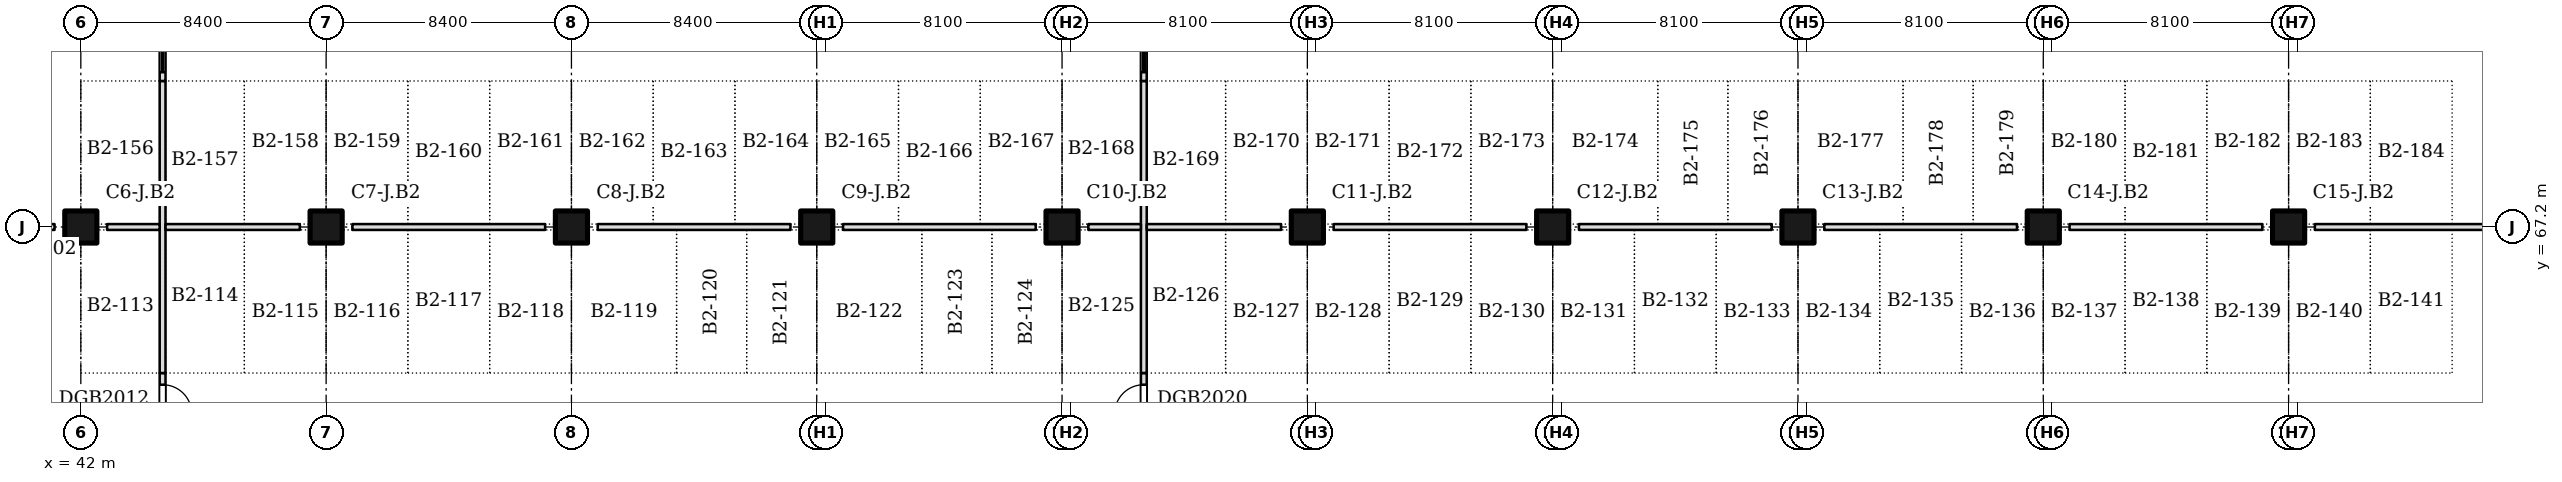
"""IFC4 building model, lengths in metres.
Left out: names, types, materials, properties, quantities, classifications, styles, units other than length and angle.
Written with IfcOpenShell. Run it as: python <this file> out.ifc"""

import sys

from ifc_helpers import new_model, si_unit, direction, frame, frame_2d, origin, origin_2d, place, context, subcontext, project, spatial, rectangle, extrude, element, fill, save


model = new_model("IFC4")
c1 = context("Model", 3, precision=1e-05, world=origin(), true_north=direction((0.0, 1.0)))
c2 = subcontext(c1, "Body", "Model", "MODEL_VIEW")
j1 = project(units=[si_unit("LENGTHUNIT", "METRE"), si_unit("PLANEANGLEUNIT", "RADIAN")], contexts=[c1])
p1 = place(None, origin())
s1 = spatial("IfcSite", under=j1, at=p1, CompositionType="ELEMENT")
p2 = place(p1, origin())
s2 = spatial("IfcBuilding", under=s1, at=p2, CompositionType="ELEMENT")
p3 = place(p2, frame((0.0, 0.0, -8.0)))
s3 = spatial("IfcBuildingStorey", under=s2, at=p3, CompositionType="ELEMENT", Elevation=-8.0)
for number, where, z_axis, x_axis in (
    (1, (42.0, 67.2, 0.0), (0.0, 0.0, 1.0), (1.0, 0.0, 0.0)),
    (2, (50.4, 67.2, 0.0), (0.0, 0.0, 1.0), (1.0, 0.0, 0.0)),
    (3, (58.8, 67.2, 0.0), (0.0, 0.0, 1.0), (1.0, 0.0, 0.0)),
    (4, (67.2, 67.2, 0.0), (0.0, 0.0, 1.0), (1.0, 0.0, 0.0)),
    (5, (75.6, 67.2, 0.0), (0.0, 0.0, 1.0), (1.0, 0.0, 0.0)),
    (6, (84.0, 67.2, 0.0), (0.0, 0.0, 1.0), (1.0, 0.0, 0.0)),
    (7, (92.4, 67.2, 0.0), (0.0, 0.0, 1.0), (1.0, 0.0, 0.0)),
    (8, (100.8, 67.2, 0.0), (0.0, 0.0, 1.0), (1.0, 0.0, 0.0)),
    (9, (109.2, 67.2, 0.0), (0.0, 0.0, 1.0), (1.0, 0.0, 0.0)),
    (10, (117.6, 67.2, 0.0), (0.0, 0.0, 1.0), (1.0, 0.0, 0.0)),
):
    element("IfcColumn", number, at=place(p3, frame(where, z_axis=z_axis, x_axis=x_axis)), inside=s3, PredefinedType="COLUMN", context=c2, shape_type="SweptSolid", body=[
        extrude(rectangle(XDim=1.1, YDim=1.1, at=origin_2d()), origin(), (0.0, 0.0, 1.0), 3.7),
    ])
p4 = place(p3, frame((44.8, 55.4, 0.0), z_axis=(0.0, 0.0, 1.0), x_axis=(0.0, 1.0, 0.0)))
e11 = element("IfcWall", 11, at=p4, inside=s3, PredefinedType="PARTITIONING", context=c2, shape_type="SweptSolid", body=[
    extrude(rectangle(XDim=6.8, YDim=0.2, at=frame_2d((3.4, 0.0))), origin(), (0.0, 0.0, 1.0), 3.7),
])
p5 = place(p4, frame((0.3, 0.0, 0.0)))
e12 = element("IfcOpeningElement", 12, at=p5, cuts=e11, PredefinedType="OPENING", context=c2, shape_type="SweptSolid", body=[
    extrude(rectangle(XDim=4.8, YDim=2.4, at=frame_2d((2.4, 1.2))), frame((0.0, 0.11, 0.0), z_axis=(0.0, -1.0, 0.0), x_axis=(1.0, 0.0, 0.0)), (0.0, 0.0, 1.0), 0.22),
])
p6 = place(p4, frame((5.4, 0.0, 0.0)))
e13 = element("IfcOpeningElement", 13, at=p6, cuts=e11, PredefinedType="OPENING", context=c2, shape_type="SweptSolid", body=[
    extrude(rectangle(XDim=1.0, YDim=2.1, at=frame_2d((0.5, 1.05))), frame((0.0, 0.11, 0.0), z_axis=(0.0, -1.0, 0.0), x_axis=(1.0, 0.0, 0.0)), (0.0, 0.0, 1.0), 0.22),
])
p7 = place(p3, frame((44.8, 62.2, 0.0), z_axis=(0.0, 0.0, 1.0), x_axis=(0.0, 1.0, 0.0)))
e14 = element("IfcWall", 14, at=p7, inside=s3, PredefinedType="PARTITIONING", context=c2, shape_type="SweptSolid", body=[
    extrude(rectangle(XDim=10.0, YDim=0.2, at=frame_2d((5.0, 0.0))), origin(), (0.0, 0.0, 1.0), 3.7),
])
p8 = place(p3, frame((44.8, 72.2, 0.0), z_axis=(0.0, 0.0, 1.0), x_axis=(0.0, 1.0, 0.0)))
e15 = element("IfcWall", 15, at=p8, inside=s3, PredefinedType="PARTITIONING", context=c2, shape_type="SweptSolid", body=[
    extrude(rectangle(XDim=6.8, YDim=0.2, at=frame_2d((3.4, 0.0))), origin(), (0.0, 0.0, 1.0), 3.7),
])
p9 = place(p8, frame((0.3, 0.0, 0.0)))
e16 = element("IfcOpeningElement", 16, at=p9, cuts=e15, PredefinedType="OPENING", context=c2, shape_type="SweptSolid", body=[
    extrude(rectangle(XDim=4.8, YDim=2.4, at=frame_2d((2.4, 1.2))), frame((0.0, 0.11, 0.0), z_axis=(0.0, -1.0, 0.0), x_axis=(1.0, 0.0, 0.0)), (0.0, 0.0, 1.0), 0.22),
])
p10 = place(p8, frame((5.4, 0.0, 0.0)))
e17 = element("IfcOpeningElement", 17, at=p10, cuts=e15, PredefinedType="OPENING", context=c2, shape_type="SweptSolid", body=[
    extrude(rectangle(XDim=1.0, YDim=2.1, at=frame_2d((0.5, 1.05))), frame((0.0, 0.11, 0.0), z_axis=(0.0, -1.0, 0.0), x_axis=(1.0, 0.0, 0.0)), (0.0, 0.0, 1.0), 0.22),
])
p11 = place(p3, frame((78.4, 55.4, 0.0), z_axis=(0.0, 0.0, 1.0), x_axis=(0.0, 1.0, 0.0)))
e18 = element("IfcWall", 18, at=p11, inside=s3, PredefinedType="PARTITIONING", context=c2, shape_type="SweptSolid", body=[
    extrude(rectangle(XDim=6.8, YDim=0.2, at=frame_2d((3.4, 0.0))), origin(), (0.0, 0.0, 1.0), 3.7),
])
p12 = place(p11, frame((0.3, 0.0, 0.0)))
e19 = element("IfcOpeningElement", 19, at=p12, cuts=e18, PredefinedType="OPENING", context=c2, shape_type="SweptSolid", body=[
    extrude(rectangle(XDim=4.8, YDim=2.4, at=frame_2d((2.4, 1.2))), frame((0.0, 0.11, 0.0), z_axis=(0.0, -1.0, 0.0), x_axis=(1.0, 0.0, 0.0)), (0.0, 0.0, 1.0), 0.22),
])
p13 = place(p11, frame((5.4, 0.0, 0.0)))
e20 = element("IfcOpeningElement", 20, at=p13, cuts=e18, PredefinedType="OPENING", context=c2, shape_type="SweptSolid", body=[
    extrude(rectangle(XDim=1.0, YDim=2.1, at=frame_2d((0.5, 1.05))), frame((0.0, 0.11, 0.0), z_axis=(0.0, -1.0, 0.0), x_axis=(1.0, 0.0, 0.0)), (0.0, 0.0, 1.0), 0.22),
])
p14 = place(p3, frame((78.4, 62.2, 0.0), z_axis=(0.0, 0.0, 1.0), x_axis=(0.0, 1.0, 0.0)))
e21 = element("IfcWall", 21, at=p14, inside=s3, PredefinedType="PARTITIONING", context=c2, shape_type="SweptSolid", body=[
    extrude(rectangle(XDim=10.0, YDim=0.2, at=frame_2d((5.0, 0.0))), origin(), (0.0, 0.0, 1.0), 3.7),
])
p15 = place(p3, frame((78.4, 72.2, 0.0), z_axis=(0.0, 0.0, 1.0), x_axis=(0.0, 1.0, 0.0)))
e22 = element("IfcWall", 22, at=p15, inside=s3, PredefinedType="PARTITIONING", context=c2, shape_type="SweptSolid", body=[
    extrude(rectangle(XDim=6.8, YDim=0.2, at=frame_2d((3.4, 0.0))), origin(), (0.0, 0.0, 1.0), 3.7),
])
p16 = place(p15, frame((0.3, 0.0, 0.0)))
e23 = element("IfcOpeningElement", 23, at=p16, cuts=e22, PredefinedType="OPENING", context=c2, shape_type="SweptSolid", body=[
    extrude(rectangle(XDim=4.8, YDim=2.4, at=frame_2d((2.4, 1.2))), frame((0.0, 0.11, 0.0), z_axis=(0.0, -1.0, 0.0), x_axis=(1.0, 0.0, 0.0)), (0.0, 0.0, 1.0), 0.22),
])
p17 = place(p15, frame((5.4, 0.0, 0.0)))
e24 = element("IfcOpeningElement", 24, at=p17, cuts=e22, PredefinedType="OPENING", context=c2, shape_type="SweptSolid", body=[
    extrude(rectangle(XDim=1.0, YDim=2.1, at=frame_2d((0.5, 1.05))), frame((0.0, 0.11, 0.0), z_axis=(0.0, -1.0, 0.0), x_axis=(1.0, 0.0, 0.0)), (0.0, 0.0, 1.0), 0.22),
])
p18 = place(p3, frame((34.5, 67.2, 0.0), z_axis=(0.0, 0.0, 1.0), x_axis=(1.0, 0.0, 0.0)))
e25 = element("IfcWall", 25, at=p18, inside=s3, PredefinedType="PARTITIONING", context=c2, shape_type="SweptSolid", body=[
    extrude(rectangle(XDim=6.6, YDim=0.2, at=frame_2d((3.3, 0.0))), origin(), (0.0, 0.0, 1.0), 3.7),
])
p19 = place(p18, frame((0.3, 0.0, 0.0)))
e26 = element("IfcOpeningElement", 26, at=p19, cuts=e25, PredefinedType="OPENING", context=c2, shape_type="SweptSolid", body=[
    extrude(rectangle(XDim=4.8, YDim=2.4, at=frame_2d((2.4, 1.2))), frame((0.0, 0.11, 0.0), z_axis=(0.0, -1.0, 0.0), x_axis=(1.0, 0.0, 0.0)), (0.0, 0.0, 1.0), 0.22),
])
p20 = place(p18, frame((5.3, 0.0, 0.0)))
e27 = element("IfcOpeningElement", 27, at=p20, cuts=e25, PredefinedType="OPENING", context=c2, shape_type="SweptSolid", body=[
    extrude(rectangle(XDim=1.0, YDim=2.1, at=frame_2d((0.5, 1.05))), frame((0.0, 0.11, 0.0), z_axis=(0.0, -1.0, 0.0), x_axis=(1.0, 0.0, 0.0)), (0.0, 0.0, 1.0), 0.22),
])
p21 = place(p3, frame((42.9, 67.2, 0.0), z_axis=(0.0, 0.0, 1.0), x_axis=(1.0, 0.0, 0.0)))
e28 = element("IfcWall", 28, at=p21, inside=s3, PredefinedType="PARTITIONING", context=c2, shape_type="SweptSolid", body=[
    extrude(rectangle(XDim=1.8, YDim=0.2, at=frame_2d((0.9, 0.0))), origin(), (0.0, 0.0, 1.0), 3.7),
])
p22 = place(p3, frame((44.9, 67.2, 0.0), z_axis=(0.0, 0.0, 1.0), x_axis=(1.0, 0.0, 0.0)))
e29 = element("IfcWall", 29, at=p22, inside=s3, PredefinedType="PARTITIONING", context=c2, shape_type="SweptSolid", body=[
    extrude(rectangle(XDim=4.6, YDim=0.2, at=frame_2d((2.3, 0.0))), origin(), (0.0, 0.0, 1.0), 3.7),
])
p23 = place(p3, frame((51.3, 67.2, 0.0), z_axis=(0.0, 0.0, 1.0), x_axis=(1.0, 0.0, 0.0)))
e30 = element("IfcWall", 30, at=p23, inside=s3, PredefinedType="PARTITIONING", context=c2, shape_type="SweptSolid", body=[
    extrude(rectangle(XDim=6.6, YDim=0.2, at=frame_2d((3.3, 0.0))), origin(), (0.0, 0.0, 1.0), 3.7),
])
p24 = place(p3, frame((59.7, 67.2, 0.0), z_axis=(0.0, 0.0, 1.0), x_axis=(1.0, 0.0, 0.0)))
e31 = element("IfcWall", 31, at=p24, inside=s3, PredefinedType="PARTITIONING", context=c2, shape_type="SweptSolid", body=[
    extrude(rectangle(XDim=6.6, YDim=0.2, at=frame_2d((3.3, 0.0))), origin(), (0.0, 0.0, 1.0), 3.7),
])
p25 = place(p3, frame((68.1, 67.2, 0.0), z_axis=(0.0, 0.0, 1.0), x_axis=(1.0, 0.0, 0.0)))
e32 = element("IfcWall", 32, at=p25, inside=s3, PredefinedType="PARTITIONING", context=c2, shape_type="SweptSolid", body=[
    extrude(rectangle(XDim=6.6, YDim=0.2, at=frame_2d((3.3, 0.0))), origin(), (0.0, 0.0, 1.0), 3.7),
])
p26 = place(p3, frame((76.5, 67.2, 0.0), z_axis=(0.0, 0.0, 1.0), x_axis=(1.0, 0.0, 0.0)))
e33 = element("IfcWall", 33, at=p26, inside=s3, PredefinedType="PARTITIONING", context=c2, shape_type="SweptSolid", body=[
    extrude(rectangle(XDim=1.8, YDim=0.2, at=frame_2d((0.9, 0.0))), origin(), (0.0, 0.0, 1.0), 3.7),
])
p27 = place(p3, frame((78.5, 67.2, 0.0), z_axis=(0.0, 0.0, 1.0), x_axis=(1.0, 0.0, 0.0)))
e34 = element("IfcWall", 34, at=p27, inside=s3, PredefinedType="PARTITIONING", context=c2, shape_type="SweptSolid", body=[
    extrude(rectangle(XDim=4.6, YDim=0.2, at=frame_2d((2.3, 0.0))), origin(), (0.0, 0.0, 1.0), 3.7),
])
p28 = place(p3, frame((84.9, 67.2, 0.0), z_axis=(0.0, 0.0, 1.0), x_axis=(1.0, 0.0, 0.0)))
e35 = element("IfcWall", 35, at=p28, inside=s3, PredefinedType="PARTITIONING", context=c2, shape_type="SweptSolid", body=[
    extrude(rectangle(XDim=6.6, YDim=0.2, at=frame_2d((3.3, 0.0))), origin(), (0.0, 0.0, 1.0), 3.7),
])
p29 = place(p3, frame((93.3, 67.2, 0.0), z_axis=(0.0, 0.0, 1.0), x_axis=(1.0, 0.0, 0.0)))
e36 = element("IfcWall", 36, at=p29, inside=s3, PredefinedType="PARTITIONING", context=c2, shape_type="SweptSolid", body=[
    extrude(rectangle(XDim=6.6, YDim=0.2, at=frame_2d((3.3, 0.0))), origin(), (0.0, 0.0, 1.0), 3.7),
])
p30 = place(p3, frame((101.7, 67.2, 0.0), z_axis=(0.0, 0.0, 1.0), x_axis=(1.0, 0.0, 0.0)))
e37 = element("IfcWall", 37, at=p30, inside=s3, PredefinedType="PARTITIONING", context=c2, shape_type="SweptSolid", body=[
    extrude(rectangle(XDim=6.6, YDim=0.2, at=frame_2d((3.3, 0.0))), origin(), (0.0, 0.0, 1.0), 3.7),
])
p31 = place(p3, frame((110.1, 67.2, 0.0), z_axis=(0.0, 0.0, 1.0), x_axis=(1.0, 0.0, 0.0)))
e38 = element("IfcWall", 38, at=p31, inside=s3, PredefinedType="PARTITIONING", context=c2, shape_type="SweptSolid", body=[
    extrude(rectangle(XDim=6.6, YDim=0.2, at=frame_2d((3.3, 0.0))), origin(), (0.0, 0.0, 1.0), 3.7),
])
p32 = place(p3, frame((118.5, 67.2, 0.0), z_axis=(0.0, 0.0, 1.0), x_axis=(1.0, 0.0, 0.0)))
e39 = element("IfcWall", 39, at=p32, inside=s3, PredefinedType="PARTITIONING", context=c2, shape_type="SweptSolid", body=[
    extrude(rectangle(XDim=6.6, YDim=0.2, at=frame_2d((3.3, 0.0))), origin(), (0.0, 0.0, 1.0), 3.7),
])
p33 = place(p6, frame((1.0, 0.0, 0.0), z_axis=(0.0, 0.0, 1.0), x_axis=(-1.0, 0.0, 0.0)))
e40 = element("IfcDoor", 40, at=p33, inside=s3, OperationType="SINGLE_SWING_RIGHT", PredefinedType="DOOR", context=c2, shape_type="SweptSolid", body=[
    extrude(rectangle(XDim=1.0, YDim=2.1, at=frame_2d((0.5, 1.05))), frame((0.0, 0.025, 0.0), z_axis=(0.0, -1.0, 0.0), x_axis=(1.0, 0.0, 0.0)), (0.0, 0.0, 1.0), 0.05),
])
fill(e13, e40)
p34 = place(p9, origin())
e41 = element("IfcDoor", 41, at=p34, inside=s3, OperationType="ROLLINGUP", PredefinedType="GATE", context=c2, shape_type="SweptSolid", body=[
    extrude(rectangle(XDim=4.8, YDim=2.4, at=frame_2d((2.4, 1.2))), frame((0.0, 0.025, 0.0), z_axis=(0.0, -1.0, 0.0), x_axis=(1.0, 0.0, 0.0)), (0.0, 0.0, 1.0), 0.05),
])
fill(e16, e41)
p35 = place(p13, origin())
e42 = element("IfcDoor", 42, at=p35, inside=s3, OperationType="SINGLE_SWING_LEFT", PredefinedType="DOOR", context=c2, shape_type="SweptSolid", body=[
    extrude(rectangle(XDim=1.0, YDim=2.1, at=frame_2d((0.5, 1.05))), frame((0.0, 0.025, 0.0), z_axis=(0.0, -1.0, 0.0), x_axis=(1.0, 0.0, 0.0)), (0.0, 0.0, 1.0), 0.05),
])
fill(e20, e42)
p36 = place(p16, origin())
e43 = element("IfcDoor", 43, at=p36, inside=s3, OperationType="ROLLINGUP", PredefinedType="GATE", context=c2, shape_type="SweptSolid", body=[
    extrude(rectangle(XDim=4.8, YDim=2.4, at=frame_2d((2.4, 1.2))), frame((0.0, 0.025, 0.0), z_axis=(0.0, -1.0, 0.0), x_axis=(1.0, 0.0, 0.0)), (0.0, 0.0, 1.0), 0.05),
])
fill(e23, e43)
save(model, sys.argv[1])
